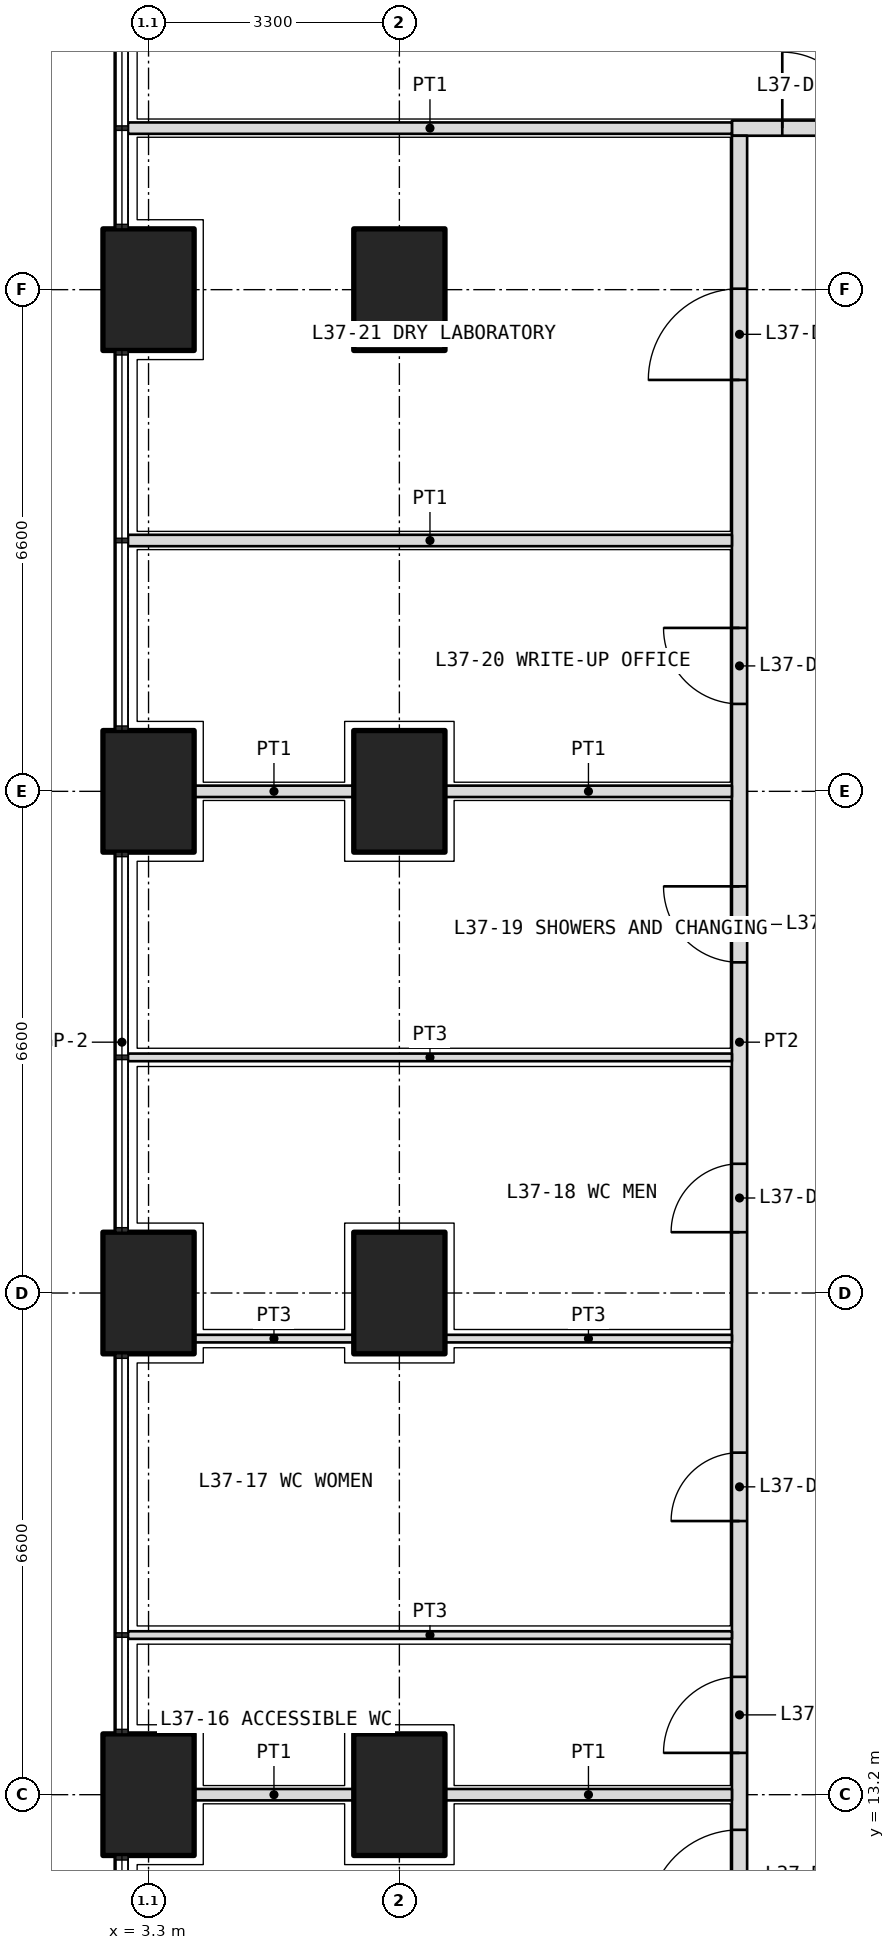
"""IFC4 building model, lengths in metres.
Left out: names, types, materials, properties, quantities, classifications, styles, units other than length and angle.
Written with IfcOpenShell. Run it as: python <this file> out.ifc"""

import sys

from ifc_helpers import new_model, si_unit, direction, frame, frame_2d, origin, origin_2d, place, context, subcontext, project, spatial, rectangle, extrude, element, fill, save


model = new_model("IFC4")
c1 = context("Model", 3, precision=1e-05, world=origin(), true_north=direction((0.0, 1.0)))
c2 = subcontext(c1, "Body", "Model", "MODEL_VIEW")
j1 = project(units=[si_unit("LENGTHUNIT", "METRE"), si_unit("PLANEANGLEUNIT", "RADIAN")], contexts=[c1])
p1 = place(None, origin())
s1 = spatial("IfcSite", under=j1, at=p1, CompositionType="ELEMENT")
p2 = place(p1, origin())
s2 = spatial("IfcBuilding", under=s1, at=p2, CompositionType="ELEMENT")
p3 = place(p2, frame((0.0, 0.0, 164.1)))
s3 = spatial("IfcBuildingStorey", under=s2, at=p3, CompositionType="ELEMENT", Elevation=164.1)
for number, where, z_axis, x_axis in (
    (1, (3.3, 13.2, 0.0), (0.0, 0.0, 1.0), (0.0, 1.0, 0.0)),
    (2, (3.3, 19.8, 0.0), (0.0, 0.0, 1.0), (0.0, 1.0, 0.0)),
    (3, (3.3, 26.4, 0.0), (0.0, 0.0, 1.0), (0.0, 1.0, 0.0)),
    (4, (3.3, 33.0, 0.0), (0.0, 0.0, 1.0), (0.0, 1.0, 0.0)),
    (5, (6.6, 13.2, 0.0), (0.0, 0.0, 1.0), (0.0, 1.0, 0.0)),
    (6, (6.6, 19.8, 0.0), (0.0, 0.0, 1.0), (0.0, 1.0, 0.0)),
    (7, (6.6, 26.4, 0.0), (0.0, 0.0, 1.0), (0.0, 1.0, 0.0)),
    (8, (6.6, 33.0, 0.0), (0.0, 0.0, 1.0), (0.0, 1.0, 0.0)),
):
    element("IfcColumn", number, at=place(p3, frame(where, z_axis=z_axis, x_axis=x_axis)), inside=s3, PredefinedType="COLUMN", context=c2, shape_type="SweptSolid", body=[
        extrude(rectangle(XDim=1.6, YDim=1.2, at=origin_2d()), origin(), (0.0, 0.0, 1.0), 4.2),
    ])
p4 = place(p3, frame((10.975, 35.125, 0.0), z_axis=(0.0, 0.0, 1.0), x_axis=(1.0, 0.0, 0.0)))
e9 = element("IfcWall", 9, at=p4, inside=s3, PredefinedType="PARTITIONING", context=c2, shape_type="SweptSolid", body=[
    extrude(rectangle(XDim=30.85, YDim=0.2, at=frame_2d((15.425, 0.0))), origin(), (0.0, 0.0, 1.0), 2.85),
])
p5 = place(p4, frame((0.663, 0.0, 0.0)))
e10 = element("IfcOpeningElement", 10, at=p5, cuts=e9, PredefinedType="OPENING", context=c2, shape_type="SweptSolid", body=[
    extrude(rectangle(XDim=1.0, YDim=2.1, at=frame_2d((0.5, 1.05))), frame((0.0, 0.11, 0.0), z_axis=(0.0, -1.0, 0.0), x_axis=(1.0, 0.0, 0.0)), (0.0, 0.0, 1.0), 0.22),
])
p6 = place(p4, frame((3.275, 0.0, 0.0)))
e11 = element("IfcOpeningElement", 11, at=p6, cuts=e9, PredefinedType="OPENING", context=c2, shape_type="SweptSolid", body=[
    extrude(rectangle(XDim=1.2, YDim=2.1, at=frame_2d((0.6, 1.05))), frame((0.0, 0.11, 0.0), z_axis=(0.0, -1.0, 0.0), x_axis=(1.0, 0.0, 0.0)), (0.0, 0.0, 1.0), 0.22),
])
p7 = place(p4, frame((11.625, 0.0, 0.0)))
e12 = element("IfcOpeningElement", 12, at=p7, cuts=e9, PredefinedType="OPENING", context=c2, shape_type="SweptSolid", body=[
    extrude(rectangle(XDim=1.0, YDim=2.1, at=frame_2d((0.5, 1.05))), frame((0.0, 0.11, 0.0), z_axis=(0.0, -1.0, 0.0), x_axis=(1.0, 0.0, 0.0)), (0.0, 0.0, 1.0), 0.22),
])
p8 = place(p4, frame((24.137, 0.0, 0.0)))
e13 = element("IfcOpeningElement", 13, at=p8, cuts=e9, PredefinedType="OPENING", context=c2, shape_type="SweptSolid", body=[
    extrude(rectangle(XDim=1.2, YDim=2.1, at=frame_2d((0.6, 1.05))), frame((0.0, 0.11, 0.0), z_axis=(0.0, -1.0, 0.0), x_axis=(1.0, 0.0, 0.0)), (0.0, 0.0, 1.0), 0.22),
])
p9 = place(p3, frame((11.075, 11.175, 0.0), z_axis=(0.0, 0.0, 1.0), x_axis=(0.0, 1.0, 0.0)))
e14 = element("IfcWall", 14, at=p9, inside=s3, PredefinedType="PARTITIONING", context=c2, shape_type="SweptSolid", body=[
    extrude(rectangle(XDim=23.85, YDim=0.2, at=frame_2d((11.925, 0.0))), origin(), (0.0, 0.0, 1.0), 2.85),
])
p10 = place(p9, frame((0.363, 0.0, 0.0)))
e15 = element("IfcOpeningElement", 15, at=p10, cuts=e14, PredefinedType="OPENING", context=c2, shape_type="SweptSolid", body=[
    extrude(rectangle(XDim=1.2, YDim=2.1, at=frame_2d((0.6, 1.05))), frame((0.0, 0.11, 0.0), z_axis=(0.0, -1.0, 0.0), x_axis=(1.0, 0.0, 0.0)), (0.0, 0.0, 1.0), 0.22),
])
p11 = place(p9, frame((2.575, 0.0, 0.0)))
e16 = element("IfcOpeningElement", 16, at=p11, cuts=e14, PredefinedType="OPENING", context=c2, shape_type="SweptSolid", body=[
    extrude(rectangle(XDim=1.0, YDim=2.1, at=frame_2d((0.5, 1.05))), frame((0.0, 0.11, 0.0), z_axis=(0.0, -1.0, 0.0), x_axis=(1.0, 0.0, 0.0)), (0.0, 0.0, 1.0), 0.22),
])
p12 = place(p9, frame((5.625, 0.0, 0.0)))
e17 = element("IfcOpeningElement", 17, at=p12, cuts=e14, PredefinedType="OPENING", context=c2, shape_type="SweptSolid", body=[
    extrude(rectangle(XDim=0.9, YDim=2.1, at=frame_2d((0.45, 1.05))), frame((0.0, 0.11, 0.0), z_axis=(0.0, -1.0, 0.0), x_axis=(1.0, 0.0, 0.0)), (0.0, 0.0, 1.0), 0.22),
])
p13 = place(p9, frame((9.425, 0.0, 0.0)))
e18 = element("IfcOpeningElement", 18, at=p13, cuts=e14, PredefinedType="OPENING", context=c2, shape_type="SweptSolid", body=[
    extrude(rectangle(XDim=0.9, YDim=2.1, at=frame_2d((0.45, 1.05))), frame((0.0, 0.11, 0.0), z_axis=(0.0, -1.0, 0.0), x_axis=(1.0, 0.0, 0.0)), (0.0, 0.0, 1.0), 0.22),
])
p14 = place(p9, frame((12.975, 0.0, 0.0)))
e19 = element("IfcOpeningElement", 19, at=p14, cuts=e14, PredefinedType="OPENING", context=c2, shape_type="SweptSolid", body=[
    extrude(rectangle(XDim=1.0, YDim=2.1, at=frame_2d((0.5, 1.05))), frame((0.0, 0.11, 0.0), z_axis=(0.0, -1.0, 0.0), x_axis=(1.0, 0.0, 0.0)), (0.0, 0.0, 1.0), 0.22),
])
p15 = place(p9, frame((16.375, 0.0, 0.0)))
e20 = element("IfcOpeningElement", 20, at=p15, cuts=e14, PredefinedType="OPENING", context=c2, shape_type="SweptSolid", body=[
    extrude(rectangle(XDim=1.0, YDim=2.1, at=frame_2d((0.5, 1.05))), frame((0.0, 0.11, 0.0), z_axis=(0.0, -1.0, 0.0), x_axis=(1.0, 0.0, 0.0)), (0.0, 0.0, 1.0), 0.22),
])
p16 = place(p9, frame((20.637, 0.0, 0.0)))
e21 = element("IfcOpeningElement", 21, at=p16, cuts=e14, PredefinedType="OPENING", context=c2, shape_type="SweptSolid", body=[
    extrude(rectangle(XDim=1.2, YDim=2.1, at=frame_2d((0.6, 1.05))), frame((0.0, 0.11, 0.0), z_axis=(0.0, -1.0, 0.0), x_axis=(1.0, 0.0, 0.0)), (0.0, 0.0, 1.0), 0.22),
])
p17 = place(p3, frame((3.03, 35.125, 0.0), z_axis=(0.0, 0.0, 1.0), x_axis=(1.0, 0.0, 0.0)))
e22 = element("IfcWall", 22, at=p17, inside=s3, PredefinedType="PARTITIONING", context=c2, shape_type="SweptSolid", body=[
    extrude(rectangle(XDim=7.945, YDim=0.15, at=frame_2d((3.973, 0.0))), origin(), (0.0, 0.0, 1.0), 2.7),
])
p18 = place(p3, frame((3.03, 15.3, 0.0), z_axis=(0.0, 0.0, 1.0), x_axis=(1.0, 0.0, 0.0)))
e23 = element("IfcWall", 23, at=p18, inside=s3, PredefinedType="PARTITIONING", context=c2, shape_type="SweptSolid", body=[
    extrude(rectangle(XDim=7.945, YDim=0.1, at=frame_2d((3.973, 0.0))), origin(), (0.0, 0.0, 1.0), 2.7),
])
p19 = place(p3, frame((3.9, 19.2, 0.0), z_axis=(0.0, 0.0, 1.0), x_axis=(1.0, 0.0, 0.0)))
e24 = element("IfcWall", 24, at=p19, inside=s3, PredefinedType="PARTITIONING", context=c2, shape_type="SweptSolid", body=[
    extrude(rectangle(XDim=2.1, YDim=0.1, at=frame_2d((1.05, 0.0))), origin(), (0.0, 0.0, 1.0), 2.85),
])
p20 = place(p3, frame((7.2, 19.2, 0.0), z_axis=(0.0, 0.0, 1.0), x_axis=(1.0, 0.0, 0.0)))
e25 = element("IfcWall", 25, at=p20, inside=s3, PredefinedType="PARTITIONING", context=c2, shape_type="SweptSolid", body=[
    extrude(rectangle(XDim=3.775, YDim=0.1, at=frame_2d((1.888, 0.0))), origin(), (0.0, 0.0, 1.0), 2.85),
])
p21 = place(p3, frame((3.03, 22.9, 0.0), z_axis=(0.0, 0.0, 1.0), x_axis=(1.0, 0.0, 0.0)))
e26 = element("IfcWall", 26, at=p21, inside=s3, PredefinedType="PARTITIONING", context=c2, shape_type="SweptSolid", body=[
    extrude(rectangle(XDim=7.945, YDim=0.1, at=frame_2d((3.973, 0.0))), origin(), (0.0, 0.0, 1.0), 2.7),
])
p22 = place(p3, frame((3.9, 13.2, 0.0), z_axis=(0.0, 0.0, 1.0), x_axis=(1.0, 0.0, 0.0)))
e27 = element("IfcWall", 27, at=p22, inside=s3, PredefinedType="PARTITIONING", context=c2, shape_type="SweptSolid", body=[
    extrude(rectangle(XDim=2.1, YDim=0.15, at=frame_2d((1.05, 0.0))), origin(), (0.0, 0.0, 1.0), 2.85),
])
p23 = place(p3, frame((7.2, 13.2, 0.0), z_axis=(0.0, 0.0, 1.0), x_axis=(1.0, 0.0, 0.0)))
e28 = element("IfcWall", 28, at=p23, inside=s3, PredefinedType="PARTITIONING", context=c2, shape_type="SweptSolid", body=[
    extrude(rectangle(XDim=3.775, YDim=0.15, at=frame_2d((1.888, 0.0))), origin(), (0.0, 0.0, 1.0), 2.85),
])
p24 = place(p3, frame((3.9, 26.4, 0.0), z_axis=(0.0, 0.0, 1.0), x_axis=(1.0, 0.0, 0.0)))
e29 = element("IfcWall", 29, at=p24, inside=s3, PredefinedType="PARTITIONING", context=c2, shape_type="SweptSolid", body=[
    extrude(rectangle(XDim=2.1, YDim=0.15, at=frame_2d((1.05, 0.0))), origin(), (0.0, 0.0, 1.0), 2.85),
])
p25 = place(p3, frame((7.2, 26.4, 0.0), z_axis=(0.0, 0.0, 1.0), x_axis=(1.0, 0.0, 0.0)))
e30 = element("IfcWall", 30, at=p25, inside=s3, PredefinedType="PARTITIONING", context=c2, shape_type="SweptSolid", body=[
    extrude(rectangle(XDim=3.775, YDim=0.15, at=frame_2d((1.888, 0.0))), origin(), (0.0, 0.0, 1.0), 2.85),
])
p26 = place(p3, frame((3.03, 29.7, 0.0), z_axis=(0.0, 0.0, 1.0), x_axis=(1.0, 0.0, 0.0)))
e31 = element("IfcWall", 31, at=p26, inside=s3, PredefinedType="PARTITIONING", context=c2, shape_type="SweptSolid", body=[
    extrude(rectangle(XDim=7.945, YDim=0.15, at=frame_2d((3.973, 0.0))), origin(), (0.0, 0.0, 1.0), 2.7),
])
p27 = place(p5, origin())
e32 = element("IfcDoor", 32, at=p27, inside=s3, OperationType="SINGLE_SWING_LEFT", PredefinedType="DOOR", context=c2, shape_type="SweptSolid", body=[
    extrude(rectangle(XDim=1.0, YDim=2.1, at=frame_2d((0.5, 1.05))), frame((0.0, 0.025, 0.0), z_axis=(0.0, -1.0, 0.0), x_axis=(1.0, 0.0, 0.0)), (0.0, 0.0, 1.0), 0.05),
])
fill(e10, e32)
p28 = place(p10, origin())
e33 = element("IfcDoor", 33, at=p28, inside=s3, OperationType="DOUBLE_DOOR_SINGLE_SWING", PredefinedType="DOOR", context=c2, shape_type="SweptSolid", body=[
    extrude(rectangle(XDim=1.2, YDim=2.1, at=frame_2d((0.6, 1.05))), frame((0.0, 0.025, 0.0), z_axis=(0.0, -1.0, 0.0), x_axis=(1.0, 0.0, 0.0)), (0.0, 0.0, 1.0), 0.05),
])
fill(e15, e33)
p29 = place(p11, origin())
e34 = element("IfcDoor", 34, at=p29, inside=s3, OperationType="SINGLE_SWING_LEFT", PredefinedType="DOOR", context=c2, shape_type="SweptSolid", body=[
    extrude(rectangle(XDim=1.0, YDim=2.1, at=frame_2d((0.5, 1.05))), frame((0.0, 0.025, 0.0), z_axis=(0.0, -1.0, 0.0), x_axis=(1.0, 0.0, 0.0)), (0.0, 0.0, 1.0), 0.05),
])
fill(e16, e34)
p30 = place(p12, origin())
e35 = element("IfcDoor", 35, at=p30, inside=s3, OperationType="SINGLE_SWING_LEFT", PredefinedType="DOOR", context=c2, shape_type="SweptSolid", body=[
    extrude(rectangle(XDim=0.9, YDim=2.1, at=frame_2d((0.45, 1.05))), frame((0.0, 0.025, 0.0), z_axis=(0.0, -1.0, 0.0), x_axis=(1.0, 0.0, 0.0)), (0.0, 0.0, 1.0), 0.05),
])
fill(e17, e35)
p31 = place(p13, origin())
e36 = element("IfcDoor", 36, at=p31, inside=s3, OperationType="SINGLE_SWING_LEFT", PredefinedType="DOOR", context=c2, shape_type="SweptSolid", body=[
    extrude(rectangle(XDim=0.9, YDim=2.1, at=frame_2d((0.45, 1.05))), frame((0.0, 0.025, 0.0), z_axis=(0.0, -1.0, 0.0), x_axis=(1.0, 0.0, 0.0)), (0.0, 0.0, 1.0), 0.05),
])
fill(e18, e36)
p32 = place(p14, origin())
e37 = element("IfcDoor", 37, at=p32, inside=s3, OperationType="SINGLE_SWING_RIGHT", PredefinedType="DOOR", context=c2, shape_type="SweptSolid", body=[
    extrude(rectangle(XDim=1.0, YDim=2.1, at=frame_2d((0.5, 1.05))), frame((0.0, 0.025, 0.0), z_axis=(0.0, -1.0, 0.0), x_axis=(1.0, 0.0, 0.0)), (0.0, 0.0, 1.0), 0.05),
])
fill(e19, e37)
p33 = place(p15, origin())
e38 = element("IfcDoor", 38, at=p33, inside=s3, OperationType="SINGLE_SWING_RIGHT", PredefinedType="DOOR", context=c2, shape_type="SweptSolid", body=[
    extrude(rectangle(XDim=1.0, YDim=2.1, at=frame_2d((0.5, 1.05))), frame((0.0, 0.025, 0.0), z_axis=(0.0, -1.0, 0.0), x_axis=(1.0, 0.0, 0.0)), (0.0, 0.0, 1.0), 0.05),
])
fill(e20, e38)
p34 = place(p16, origin())
e39 = element("IfcDoor", 39, at=p34, inside=s3, OperationType="DOUBLE_DOOR_SINGLE_SWING", PredefinedType="DOOR", context=c2, shape_type="SweptSolid", body=[
    extrude(rectangle(XDim=1.2, YDim=2.1, at=frame_2d((0.6, 1.05))), frame((0.0, 0.025, 0.0), z_axis=(0.0, -1.0, 0.0), x_axis=(1.0, 0.0, 0.0)), (0.0, 0.0, 1.0), 0.05),
])
fill(e21, e39)
save(model, sys.argv[1])
